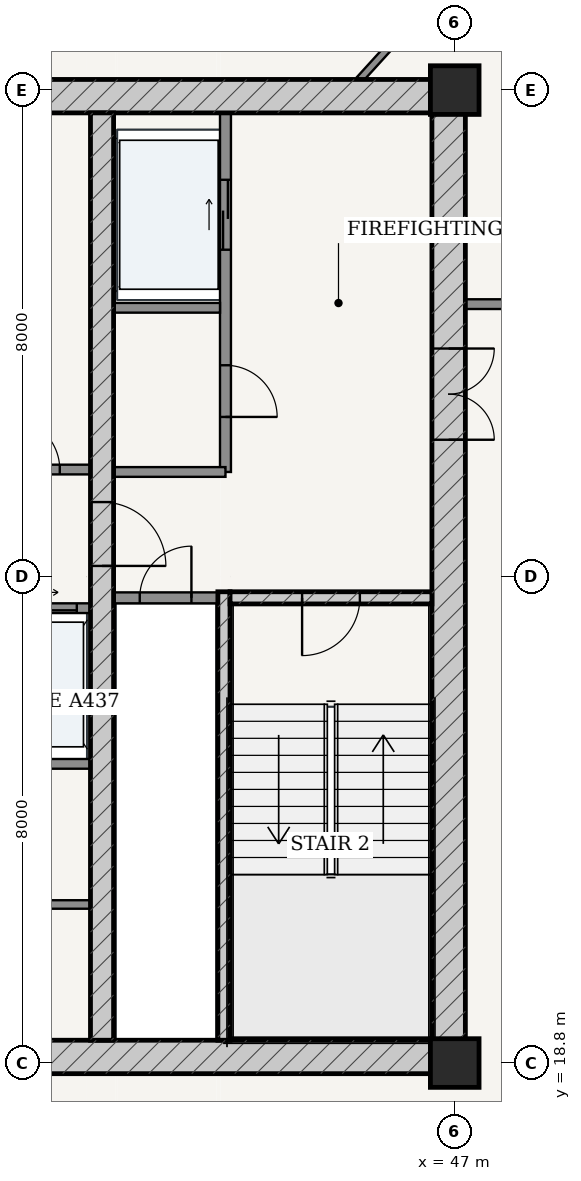
"""IFC4 building model, lengths in metres.
Left out: names, types, materials, properties, quantities, classifications, styles, units other than length and angle.
Written with IfcOpenShell. Run it as: python <this file> out.ifc"""

import sys

from ifc_helpers import new_model, si_unit, direction, frame, frame_2d, origin, origin_2d, place, context, subcontext, project, spatial, rectangle, extrude, source, transform, mapped, element, fill, save


model = new_model("IFC4")
c1 = context("Model", 3, precision=1e-05, world=origin(), true_north=direction((-0.2419218956, 0.970295726276)))
c2 = subcontext(c1, "Body", "Model", "MODEL_VIEW")
j1 = project(units=[si_unit("LENGTHUNIT", "METRE"), si_unit("PLANEANGLEUNIT", "RADIAN")], contexts=[c1])
p1 = place(None, origin())
s1 = spatial("IfcSite", under=j1, at=p1, CompositionType="ELEMENT")
p2 = place(p1, origin())
s2 = spatial("IfcBuilding", under=s1, at=p2, CompositionType="ELEMENT")
p3 = place(p2, frame((0.0, 0.0, 281.95)))
s3 = spatial("IfcBuildingStorey", under=s2, at=p3, CompositionType="ELEMENT", Elevation=281.95)
for number, where, z_axis, x_axis in (
    (1, (47.0, 18.8, 0.0), (0.0, 0.0, 1.0), (1.0, 0.0, 0.0)),
    (2, (47.0, 34.8, 0.0), (0.0, 0.0, 1.0), (1.0, 0.0, 0.0)),
):
    element("IfcColumn", number, at=place(p3, frame(where, z_axis=z_axis, x_axis=x_axis)), inside=s3, PredefinedType="COLUMN", context=c2, shape_type="SweptSolid", body=[
        extrude(rectangle(XDim=0.8, YDim=0.8, at=origin_2d()), origin(), (0.0, 0.0, 1.0), 3.75),
    ])
p4 = place(p3, frame((28.825, 18.9, 0.0), z_axis=(0.0, 0.0, 1.0), x_axis=(1.0, 0.0, 0.0)))
e3 = element("IfcWall", 3, at=p4, inside=s3, PredefinedType="SHEAR", context=c2, shape_type="SweptSolid", body=[
    extrude(rectangle(XDim=18.35, YDim=0.55, at=frame_2d((9.175, 0.0))), origin(), (0.0, 0.0, 1.0), 3.49),
])
p5 = place(p4, frame((7.41, 0.0, 0.0)))
e4 = element("IfcOpeningElement", 4, at=p5, cuts=e3, PredefinedType="OPENING", context=c2, shape_type="SweptSolid", body=[
    extrude(rectangle(XDim=0.85, YDim=2.1, at=frame_2d((0.425, 1.05))), frame((0.0, 0.285, 0.0), z_axis=(0.0, -1.0, 0.0), x_axis=(1.0, 0.0, 0.0)), (0.0, 0.0, 1.0), 0.57),
])
p6 = place(p4, frame((10.49, 0.0, 0.0)))
e5 = element("IfcOpeningElement", 5, at=p6, cuts=e3, PredefinedType="OPENING", context=c2, shape_type="SweptSolid", body=[
    extrude(rectangle(XDim=0.85, YDim=2.1, at=frame_2d((0.425, 1.05))), frame((0.0, 0.285, 0.0), z_axis=(0.0, -1.0, 0.0), x_axis=(1.0, 0.0, 0.0)), (0.0, 0.0, 1.0), 0.57),
])
p7 = place(p3, frame((28.825, 34.7, 0.0), z_axis=(0.0, 0.0, 1.0), x_axis=(1.0, 0.0, 0.0)))
e6 = element("IfcWall", 6, at=p7, inside=s3, PredefinedType="SHEAR", context=c2, shape_type="SweptSolid", body=[
    extrude(rectangle(XDim=18.35, YDim=0.55, at=frame_2d((9.175, 0.0))), origin(), (0.0, 0.0, 1.0), 3.49),
])
p8 = place(p3, frame((46.9, 19.175, 0.0), z_axis=(0.0, 0.0, 1.0), x_axis=(0.0, 1.0, 0.0)))
e7 = element("IfcWall", 7, at=p8, inside=s3, PredefinedType="SHEAR", context=c2, shape_type="SweptSolid", body=[
    extrude(rectangle(XDim=15.25, YDim=0.55, at=frame_2d((7.625, 0.0))), origin(), (0.0, 0.0, 1.0), 3.49),
])
p9 = place(p8, frame((9.875, 0.0, 0.0)))
e8 = element("IfcOpeningElement", 8, at=p9, cuts=e7, PredefinedType="OPENING", context=c2, shape_type="SweptSolid", body=[
    extrude(rectangle(XDim=1.5, YDim=2.2, at=frame_2d((0.75, 1.1))), frame((0.0, 0.285, 0.0), z_axis=(0.0, -1.0, 0.0), x_axis=(1.0, 0.0, 0.0)), (0.0, 0.0, 1.0), 0.57),
])
p10 = place(p3, frame((43.205, 19.175, 0.0), z_axis=(0.0, 0.0, 1.0), x_axis=(0.0, 1.0, 0.0)))
e9 = element("IfcWall", 9, at=p10, inside=s3, PredefinedType="SOLIDWALL", context=c2, shape_type="SweptSolid", body=[
    extrude(rectangle(XDim=7.375, YDim=0.2, at=frame_2d((3.688, 0.0))), origin(), (0.0, 0.0, 1.0), 3.49),
])
p11 = place(p3, frame((43.305, 26.45, 0.0), z_axis=(0.0, 0.0, 1.0), x_axis=(1.0, 0.0, 0.0)))
e10 = element("IfcWall", 10, at=p11, inside=s3, PredefinedType="SOLIDWALL", context=c2, shape_type="SweptSolid", body=[
    extrude(rectangle(XDim=3.32, YDim=0.2, at=frame_2d((1.66, 0.0))), origin(), (0.0, 0.0, 1.0), 3.49),
])
p12 = place(p11, frame((1.185, 0.0, 0.0)))
e11 = element("IfcOpeningElement", 11, at=p12, cuts=e10, PredefinedType="OPENING", context=c2, shape_type="SweptSolid", body=[
    extrude(rectangle(XDim=0.95, YDim=2.15, at=frame_2d((0.475, 1.075))), frame((0.0, 0.11, 0.0), z_axis=(0.0, -1.0, 0.0), x_axis=(1.0, 0.0, 0.0)), (0.0, 0.0, 1.0), 0.22),
])
p13 = place(p3, frame((41.2, 19.175, 0.0), z_axis=(0.0, 0.0, 1.0), x_axis=(0.0, 1.0, 0.0)))
e12 = element("IfcWall", 12, at=p13, inside=s3, PredefinedType="SHEAR", context=c2, shape_type="SweptSolid", body=[
    extrude(rectangle(XDim=15.25, YDim=0.38, at=frame_2d((7.625, 0.0))), origin(), (0.0, 0.0, 1.0), 3.49),
])
p14 = place(p13, frame((7.8, 0.0, 0.0)))
e13 = element("IfcOpeningElement", 13, at=p14, cuts=e12, PredefinedType="OPENING", context=c2, shape_type="SweptSolid", body=[
    extrude(rectangle(XDim=1.05, YDim=2.15, at=frame_2d((0.525, 1.075))), frame((0.0, 0.2, 0.0), z_axis=(0.0, -1.0, 0.0), x_axis=(1.0, 0.0, 0.0)), (0.0, 0.0, 1.0), 0.4),
])
p15 = place(p3, frame((41.39, 26.45, 0.0), z_axis=(0.0, 0.0, 1.0), x_axis=(1.0, 0.0, 0.0)))
e14 = element("IfcWall", 14, at=p15, inside=s3, PredefinedType="PARTITIONING", context=c2, shape_type="SweptSolid", body=[
    extrude(rectangle(XDim=1.71, YDim=0.18, at=frame_2d((0.855, 0.0))), origin(), (0.0, 0.0, 1.0), 3.49),
])
p16 = place(p15, frame((0.43, 0.0, 0.0)))
e15 = element("IfcOpeningElement", 15, at=p16, cuts=e14, PredefinedType="OPENING", context=c2, shape_type="SweptSolid", body=[
    extrude(rectangle(XDim=0.85, YDim=2.1, at=frame_2d((0.425, 1.05))), frame((0.0, 0.1, 0.0), z_axis=(0.0, -1.0, 0.0), x_axis=(1.0, 0.0, 0.0)), (0.0, 0.0, 1.0), 0.2),
])
p17 = place(p3, frame((43.23, 28.52, 0.0), z_axis=(0.0, 0.0, 1.0), x_axis=(0.0, 1.0, 0.0)))
e16 = element("IfcWall", 16, at=p17, inside=s3, PredefinedType="PARTITIONING", context=c2, shape_type="SweptSolid", body=[
    extrude(rectangle(XDim=5.905, YDim=0.18, at=frame_2d((2.953, 0.0))), origin(), (0.0, 0.0, 1.0), 3.49),
])
p18 = place(p17, frame((0.905, 0.0, 0.0)))
e17 = element("IfcOpeningElement", 17, at=p18, cuts=e16, PredefinedType="OPENING", context=c2, shape_type="SweptSolid", body=[
    extrude(rectangle(XDim=0.85, YDim=2.1, at=frame_2d((0.425, 1.05))), frame((0.0, 0.1, 0.0), z_axis=(0.0, -1.0, 0.0), x_axis=(1.0, 0.0, 0.0)), (0.0, 0.0, 1.0), 0.2),
])
p19 = place(p17, frame((3.655, 0.0, 0.0)))
e18 = element("IfcOpeningElement", 18, at=p19, cuts=e16, PredefinedType="OPENING", context=c2, shape_type="SweptSolid", body=[
    extrude(rectangle(XDim=1.15, YDim=2.2, at=frame_2d((0.575, 1.1))), frame((0.0, 0.1, 0.0), z_axis=(0.0, -1.0, 0.0), x_axis=(1.0, 0.0, 0.0)), (0.0, 0.0, 1.0), 0.2),
])
p20 = place(p3, frame((41.39, 31.22, 0.0), z_axis=(0.0, 0.0, 1.0), x_axis=(1.0, 0.0, 0.0)))
e19 = element("IfcWall", 19, at=p20, inside=s3, PredefinedType="PARTITIONING", context=c2, shape_type="SweptSolid", body=[
    extrude(rectangle(XDim=1.75, YDim=0.16, at=frame_2d((0.875, 0.0))), origin(), (0.0, 0.0, 1.0), 3.49),
])
p21 = place(p3, frame((41.39, 28.52, 0.0), z_axis=(0.0, 0.0, 1.0), x_axis=(1.0, 0.0, 0.0)))
e20 = element("IfcWall", 20, at=p21, inside=s3, PredefinedType="PARTITIONING", context=c2, shape_type="SweptSolid", body=[
    extrude(rectangle(XDim=1.84, YDim=0.16, at=frame_2d((0.92, 0.0))), origin(), (0.0, 0.0, 1.0), 3.49),
])
p22 = place(p3, frame((34.99, 28.56, 0.0), z_axis=(0.0, 0.0, 1.0), x_axis=(1.0, 0.0, 0.0)))
e21 = element("IfcWall", 21, at=p22, inside=s3, PredefinedType="PARTITIONING", context=c2, shape_type="SweptSolid", body=[
    extrude(rectangle(XDim=6.02, YDim=0.16, at=frame_2d((3.01, 0.0))), origin(), (0.0, 0.0, 1.0), 3.49),
])
p23 = place(p22, frame((0.505, 0.0, 0.0)))
e22 = element("IfcOpeningElement", 22, at=p23, cuts=e21, PredefinedType="OPENING", context=c2, shape_type="SweptSolid", body=[
    extrude(rectangle(XDim=0.85, YDim=2.1, at=frame_2d((0.425, 1.05))), frame((0.0, 0.09, 0.0), z_axis=(0.0, -1.0, 0.0), x_axis=(1.0, 0.0, 0.0)), (0.0, 0.0, 1.0), 0.18),
])
p24 = place(p22, frame((2.58, 0.0, 0.0)))
e23 = element("IfcOpeningElement", 23, at=p24, cuts=e21, PredefinedType="OPENING", context=c2, shape_type="SweptSolid", body=[
    extrude(rectangle(XDim=0.86, YDim=2.1, at=frame_2d((0.43, 1.05))), frame((0.0, 0.09, 0.0), z_axis=(0.0, -1.0, 0.0), x_axis=(1.0, 0.0, 0.0)), (0.0, 0.0, 1.0), 0.18),
])
p25 = place(p22, frame((4.665, 0.0, 0.0)))
e24 = element("IfcOpeningElement", 24, at=p25, cuts=e21, PredefinedType="OPENING", context=c2, shape_type="SweptSolid", body=[
    extrude(rectangle(XDim=0.85, YDim=2.1, at=frame_2d((0.425, 1.05))), frame((0.0, 0.09, 0.0), z_axis=(0.0, -1.0, 0.0), x_axis=(1.0, 0.0, 0.0)), (0.0, 0.0, 1.0), 0.18),
])
p26 = place(p3, frame((34.99, 26.28, 0.0), z_axis=(0.0, 0.0, 1.0), x_axis=(1.0, 0.0, 0.0)))
e25 = element("IfcWall", 25, at=p26, inside=s3, PredefinedType="PARTITIONING", context=c2, shape_type="SweptSolid", body=[
    extrude(rectangle(XDim=6.02, YDim=0.16, at=frame_2d((3.01, 0.0))), origin(), (0.0, 0.0, 1.0), 3.49),
])
p27 = place(p26, frame((1.045, 0.0, 0.0)))
e26 = element("IfcOpeningElement", 26, at=p27, cuts=e25, PredefinedType="OPENING", context=c2, shape_type="SweptSolid", body=[
    extrude(rectangle(XDim=0.85, YDim=2.1, at=frame_2d((0.425, 1.05))), frame((0.0, 0.09, 0.0), z_axis=(0.0, -1.0, 0.0), x_axis=(1.0, 0.0, 0.0)), (0.0, 0.0, 1.0), 0.18),
])
p28 = place(p26, frame((3.215, 0.0, 0.0)))
e27 = element("IfcOpeningElement", 27, at=p28, cuts=e25, PredefinedType="OPENING", context=c2, shape_type="SweptSolid", body=[
    extrude(rectangle(XDim=1.1, YDim=2.2, at=frame_2d((0.55, 1.1))), frame((0.0, 0.09, 0.0), z_axis=(0.0, -1.0, 0.0), x_axis=(1.0, 0.0, 0.0)), (0.0, 0.0, 1.0), 0.18),
])
p29 = place(p26, frame((4.695, 0.0, 0.0)))
e28 = element("IfcOpeningElement", 28, at=p29, cuts=e25, PredefinedType="OPENING", context=c2, shape_type="SweptSolid", body=[
    extrude(rectangle(XDim=1.1, YDim=2.2, at=frame_2d((0.55, 1.1))), frame((0.0, 0.09, 0.0), z_axis=(0.0, -1.0, 0.0), x_axis=(1.0, 0.0, 0.0)), (0.0, 0.0, 1.0), 0.18),
])
p30 = place(p3, frame((34.99, 23.72, 0.0), z_axis=(0.0, 0.0, 1.0), x_axis=(1.0, 0.0, 0.0)))
e29 = element("IfcWall", 29, at=p30, inside=s3, PredefinedType="PARTITIONING", context=c2, shape_type="SweptSolid", body=[
    extrude(rectangle(XDim=6.02, YDim=0.16, at=frame_2d((3.01, 0.0))), origin(), (0.0, 0.0, 1.0), 3.49),
])
p31 = place(p3, frame((38.4, 21.407, 0.0), z_axis=(0.0, 0.0, 1.0), x_axis=(1.0, 0.0, 0.0)))
e30 = element("IfcWall", 30, at=p31, inside=s3, PredefinedType="PARTITIONING", context=c2, shape_type="SweptSolid", body=[
    extrude(rectangle(XDim=2.61, YDim=0.14, at=frame_2d((1.305, 0.0))), origin(), (0.0, 0.0, 1.0), 3.49),
])
p32 = place(p31, frame((0.88, 0.0, 0.0)))
e31 = element("IfcOpeningElement", 31, at=p32, cuts=e30, PredefinedType="OPENING", context=c2, shape_type="SweptSolid", body=[
    extrude(rectangle(XDim=0.85, YDim=2.1, at=frame_2d((0.425, 1.05))), frame((0.0, 0.08, 0.0), z_axis=(0.0, -1.0, 0.0), x_axis=(1.0, 0.0, 0.0)), (0.0, 0.0, 1.0), 0.16),
])
p33 = place(p3, frame((47.175, 31.28, 0.0), z_axis=(0.0, 0.0, 1.0), x_axis=(1.0, 0.0, 0.0)))
e32 = element("IfcWall", 32, at=p33, inside=s3, PredefinedType="PARTITIONING", context=c2, shape_type="SweptSolid", body=[
    extrude(rectangle(XDim=1.93, YDim=0.16, at=frame_2d((0.965, 0.0))), origin(), (0.0, 0.0, 1.0), 3.49),
])
p34 = place(p3, frame((39.688, 34.977, 0.0), z_axis=(0.0, 0.0, 1.0), x_axis=(0.202091890364, 0.979366564596, 0.0)))
e33 = element("IfcWall", 33, at=p34, inside=s3, PredefinedType="PARTITIONING", context=c2, shape_type="SweptSolid", body=[
    extrude(rectangle(XDim=10.278, YDim=0.2, at=frame_2d((5.139, 0.0))), origin(), (0.0, 0.0, 1.0), 2.575),
])
p35 = place(p3, frame((45.439, 34.977, 0.0), z_axis=(0.0, 0.0, 1.0), x_axis=(0.672980108938, 0.739660579573, 0.0)))
e34 = element("IfcWall", 34, at=p35, inside=s3, PredefinedType="PARTITIONING", context=c2, shape_type="SweptSolid", body=[
    extrude(rectangle(XDim=3.519, YDim=0.12, at=frame_2d((1.759, 0.0))), origin(), (0.0, 0.0, 1.0), 3.015),
])
p36 = place(p35, frame((1.685, 0.0, 0.0)))
e35 = element("IfcOpeningElement", 35, at=p36, cuts=e34, PredefinedType="OPENING", context=c2, shape_type="SweptSolid", body=[
    extrude(rectangle(XDim=0.86, YDim=2.15, at=frame_2d((0.43, 1.075))), frame((0.0, 0.07, 0.0), z_axis=(0.0, -1.0, 0.0), x_axis=(1.0, 0.0, 0.0)), (0.0, 0.0, 1.0), 0.14),
])
m1 = source(origin(), c2, "Body", "SweptSolid", [
    extrude(rectangle(XDim=1.5, YDim=2.2, at=frame_2d((0.75, 1.1))), frame((0.0, 0.025, 0.0), z_axis=(0.0, -1.0, 0.0), x_axis=(1.0, 0.0, 0.0)), (0.0, 0.0, 1.0), 0.05),
])
p37 = place(p9, frame((1.5, 0.0, 0.0), z_axis=(0.0, 0.0, 1.0), x_axis=(-1.0, 0.0, 0.0)))
e36 = element("IfcDoor", 36, at=p37, inside=s3, OperationType="DOUBLE_DOOR_SINGLE_SWING", PredefinedType="DOOR", context=c2, shape_type="MappedRepresentation", body=[
    mapped(m1, transform((0.0, 0.0, 0.0), scale=1.0)),
])
fill(e8, e36)
m2 = source(origin(), c2, "Body", "SweptSolid", [
    extrude(rectangle(XDim=1.05, YDim=2.15, at=frame_2d((0.525, 1.075))), frame((0.0, 0.025, 0.0), z_axis=(0.0, -1.0, 0.0), x_axis=(1.0, 0.0, 0.0)), (0.0, 0.0, 1.0), 0.05),
])
p38 = place(p14, frame((1.05, 0.0, 0.0), z_axis=(0.0, 0.0, 1.0), x_axis=(-1.0, 0.0, 0.0)))
e37 = element("IfcDoor", 37, at=p38, inside=s3, OperationType="SINGLE_SWING_RIGHT", PredefinedType="DOOR", context=c2, shape_type="MappedRepresentation", body=[
    mapped(m2, transform((0.0, 0.0, 0.0), scale=1.0)),
])
fill(e13, e37)
m3 = source(origin(), c2, "Body", "SweptSolid", [
    extrude(rectangle(XDim=0.95, YDim=2.15, at=frame_2d((0.475, 1.075))), frame((0.0, 0.025, 0.0), z_axis=(0.0, -1.0, 0.0), x_axis=(1.0, 0.0, 0.0)), (0.0, 0.0, 1.0), 0.05),
])
p39 = place(p12, frame((0.95, 0.0, 0.0), z_axis=(0.0, 0.0, 1.0), x_axis=(-1.0, 0.0, 0.0)))
e38 = element("IfcDoor", 38, at=p39, inside=s3, OperationType="SINGLE_SWING_RIGHT", PredefinedType="DOOR", context=c2, shape_type="MappedRepresentation", body=[
    mapped(m3, transform((0.0, 0.0, 0.0), scale=1.0)),
])
fill(e11, e38)
m4 = source(origin(), c2, "Body", "SweptSolid", [
    extrude(rectangle(XDim=0.85, YDim=2.1, at=frame_2d((0.425, 1.05))), frame((0.0, 0.025, 0.0), z_axis=(0.0, -1.0, 0.0), x_axis=(1.0, 0.0, 0.0)), (0.0, 0.0, 1.0), 0.05),
])
p40 = place(p16, origin())
e39 = element("IfcDoor", 39, at=p40, inside=s3, OperationType="SINGLE_SWING_RIGHT", PredefinedType="DOOR", context=c2, shape_type="MappedRepresentation", body=[
    mapped(m4, transform((0.0, 0.0, 0.0), scale=1.0)),
])
fill(e15, e39)
p41 = place(p18, frame((0.85, 0.0, 0.0), z_axis=(0.0, 0.0, 1.0), x_axis=(-1.0, 0.0, 0.0)))
e40 = element("IfcDoor", 40, at=p41, inside=s3, OperationType="SINGLE_SWING_RIGHT", PredefinedType="DOOR", context=c2, shape_type="MappedRepresentation", body=[
    mapped(m4, transform((0.0, 0.0, 0.0), scale=1.0)),
])
fill(e17, e40)
p42 = place(p25, origin())
e41 = element("IfcDoor", 41, at=p42, inside=s3, OperationType="SINGLE_SWING_LEFT", PredefinedType="DOOR", context=c2, shape_type="MappedRepresentation", body=[
    mapped(m4, transform((0.0, 0.0, 0.0), scale=1.0)),
])
fill(e24, e41)
m5 = source(origin(), c2, "Body", "SweptSolid", [
    extrude(rectangle(XDim=1.15, YDim=2.2, at=frame_2d((0.575, 1.1))), frame((0.0, 0.025, 0.0), z_axis=(0.0, -1.0, 0.0), x_axis=(1.0, 0.0, 0.0)), (0.0, 0.0, 1.0), 0.05),
])
p43 = place(p19, origin())
e42 = element("IfcDoor", 42, at=p43, inside=s3, OperationType="DOUBLE_DOOR_SLIDING", PredefinedType="DOOR", context=c2, shape_type="MappedRepresentation", body=[
    mapped(m5, transform((0.0, 0.0, 0.0), scale=1.0)),
])
fill(e18, e42)
m6 = source(origin(), c2, "Body", "SweptSolid", [
    extrude(rectangle(XDim=1.1, YDim=2.2, at=frame_2d((0.55, 1.1))), frame((0.0, 0.025, 0.0), z_axis=(0.0, -1.0, 0.0), x_axis=(1.0, 0.0, 0.0)), (0.0, 0.0, 1.0), 0.05),
])
p44 = place(p29, origin())
e43 = element("IfcDoor", 43, at=p44, inside=s3, OperationType="DOUBLE_DOOR_SLIDING", PredefinedType="DOOR", context=c2, shape_type="MappedRepresentation", body=[
    mapped(m6, transform((0.0, 0.0, 0.0), scale=1.0)),
])
fill(e28, e43)
save(model, sys.argv[1])
